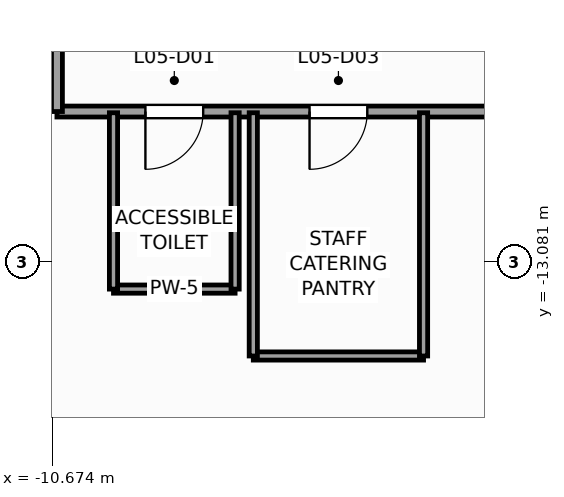
"""IFC4 building model, lengths in metres.
Left out: names, types, materials, properties, quantities, classifications, styles, units other than length and angle.
Written with IfcOpenShell. Run it as: python <this file> out.ifc"""

import sys

from ifc_helpers import new_model, si_unit, direction, frame, frame_2d, origin, place, context, subcontext, project, spatial, rectangle, extrude, source, transform, mapped, element, fill, save


model = new_model("IFC4")
c1 = context("Model", 3, precision=1e-05, world=origin(), true_north=direction((0.0, 1.0)))
c2 = subcontext(c1, "Body", "Model", "MODEL_VIEW")
j1 = project(units=[si_unit("LENGTHUNIT", "METRE"), si_unit("PLANEANGLEUNIT", "RADIAN")], contexts=[c1])
p1 = place(None, origin())
s1 = spatial("IfcSite", under=j1, at=p1, CompositionType="ELEMENT")
p2 = place(p1, origin())
s2 = spatial("IfcBuilding", under=s1, at=p2, CompositionType="ELEMENT")
p3 = place(p2, frame((0.0, 0.0, 26.0)))
s3 = spatial("IfcBuildingStorey", under=s2, at=p3, CompositionType="ELEMENT", Elevation=26.0)
p4 = place(p3, frame((-10.6, -10.6, 0.0), z_axis=(0.0, 0.0, 1.0), x_axis=(1.0, 0.0, 0.0)))
e1 = element("IfcWall", 1, at=p4, inside=s3, PredefinedType="PARTITIONING", context=c2, shape_type="SweptSolid", body=[
    extrude(rectangle(XDim=9.45, YDim=0.18, at=frame_2d((4.725, 0.0))), origin(), (0.0, 0.0, 1.0), 3.72),
])
p5 = place(p4, frame((1.455, 0.0, 0.0)))
e2 = element("IfcOpeningElement", 2, at=p5, cuts=e1, PredefinedType="OPENING", context=c2, shape_type="SweptSolid", body=[
    extrude(rectangle(XDim=0.95, YDim=2.1, at=frame_2d((0.475, 1.05))), frame((0.0, 0.1, 0.0), z_axis=(0.0, -1.0, 0.0), x_axis=(1.0, 0.0, 0.0)), (0.0, 0.0, 1.0), 0.2),
])
p6 = place(p4, frame((4.154, 0.0, 0.0)))
e3 = element("IfcOpeningElement", 3, at=p6, cuts=e1, PredefinedType="OPENING", context=c2, shape_type="SweptSolid", body=[
    extrude(rectangle(XDim=0.95, YDim=2.1, at=frame_2d((0.475, 1.05))), frame((0.0, 0.1, 0.0), z_axis=(0.0, -1.0, 0.0), x_axis=(1.0, 0.0, 0.0)), (0.0, 0.0, 1.0), 0.2),
])
p7 = place(p3, frame((-10.6, -10.6, 0.0), z_axis=(0.0, 0.0, 1.0), x_axis=(0.0, 1.0, 0.0)))
e4 = element("IfcWall", 4, at=p7, inside=s3, PredefinedType="PARTITIONING", context=c2, shape_type="SweptSolid", body=[
    extrude(rectangle(XDim=9.45, YDim=0.18, at=frame_2d((4.725, 0.0))), origin(), (0.0, 0.0, 1.0), 3.72),
])
p8 = place(p3, frame((-9.67, -13.52, 0.0), z_axis=(0.0, 0.0, 1.0), x_axis=(1.0, 0.0, 0.0)))
e5 = element("IfcWall", 5, at=p8, inside=s3, PredefinedType="PARTITIONING", context=c2, shape_type="SweptSolid", body=[
    extrude(rectangle(XDim=2.0, YDim=0.135, at=frame_2d((1.0, 0.0))), origin(), (0.0, 0.0, 1.0), 3.72),
])
for number, where, z_axis, x_axis in (
    (6, (-7.67, -13.52, 0.0), (0.0, 0.0, 1.0), (0.0, 1.0, 0.0)),
    (7, (-9.67, -13.52, 0.0), (0.0, 0.0, 1.0), (0.0, 1.0, 0.0)),
):
    element("IfcWall", number, at=place(p3, frame(where, z_axis=z_axis, x_axis=x_axis)), inside=s3, PredefinedType="PARTITIONING", context=c2, shape_type="SweptSolid", body=[
        extrude(rectangle(XDim=2.9, YDim=0.135, at=frame_2d((1.45, 0.0))), origin(), (0.0, 0.0, 1.0), 3.72),
    ])
p9 = place(p3, frame((-7.371, -14.62, 0.0), z_axis=(0.0, 0.0, 1.0), x_axis=(1.0, 0.0, 0.0)))
e8 = element("IfcWall", 8, at=p9, inside=s3, PredefinedType="PARTITIONING", context=c2, shape_type="SweptSolid", body=[
    extrude(rectangle(XDim=2.8, YDim=0.135, at=frame_2d((1.4, 0.0))), origin(), (0.0, 0.0, 1.0), 3.72),
])
for number, where, z_axis, x_axis in (
    (9, (-4.571, -14.62, 0.0), (0.0, 0.0, 1.0), (0.0, 1.0, 0.0)),
    (10, (-7.371, -14.62, 0.0), (0.0, 0.0, 1.0), (0.0, 1.0, 0.0)),
):
    element("IfcWall", number, at=place(p3, frame(where, z_axis=z_axis, x_axis=x_axis)), inside=s3, PredefinedType="PARTITIONING", context=c2, shape_type="SweptSolid", body=[
        extrude(rectangle(XDim=4.0, YDim=0.135, at=frame_2d((2.0, 0.0))), origin(), (0.0, 0.0, 1.0), 3.72),
    ])
m1 = source(origin(), c2, "Body", "SweptSolid", [
    extrude(rectangle(XDim=0.95, YDim=2.1, at=frame_2d((0.475, 1.05))), frame((0.0, 0.025, 0.0), z_axis=(0.0, -1.0, 0.0), x_axis=(1.0, 0.0, 0.0)), (0.0, 0.0, 1.0), 0.05),
])
p10 = place(p5, frame((0.95, 0.0, 0.0), z_axis=(0.0, 0.0, 1.0), x_axis=(-1.0, 0.0, 0.0)))
e11 = element("IfcDoor", 11, at=p10, inside=s3, OperationType="SINGLE_SWING_LEFT", PredefinedType="DOOR", context=c2, shape_type="MappedRepresentation", body=[
    mapped(m1, transform((0.0, 0.0, 0.0), scale=1.0)),
])
fill(e2, e11)
p11 = place(p6, frame((0.95, 0.0, 0.0), z_axis=(0.0, 0.0, 1.0), x_axis=(-1.0, 0.0, 0.0)))
e12 = element("IfcDoor", 12, at=p11, inside=s3, OperationType="SINGLE_SWING_LEFT", PredefinedType="DOOR", context=c2, shape_type="MappedRepresentation", body=[
    mapped(m1, transform((0.0, 0.0, 0.0), scale=1.0)),
])
fill(e3, e12)
save(model, sys.argv[1])
